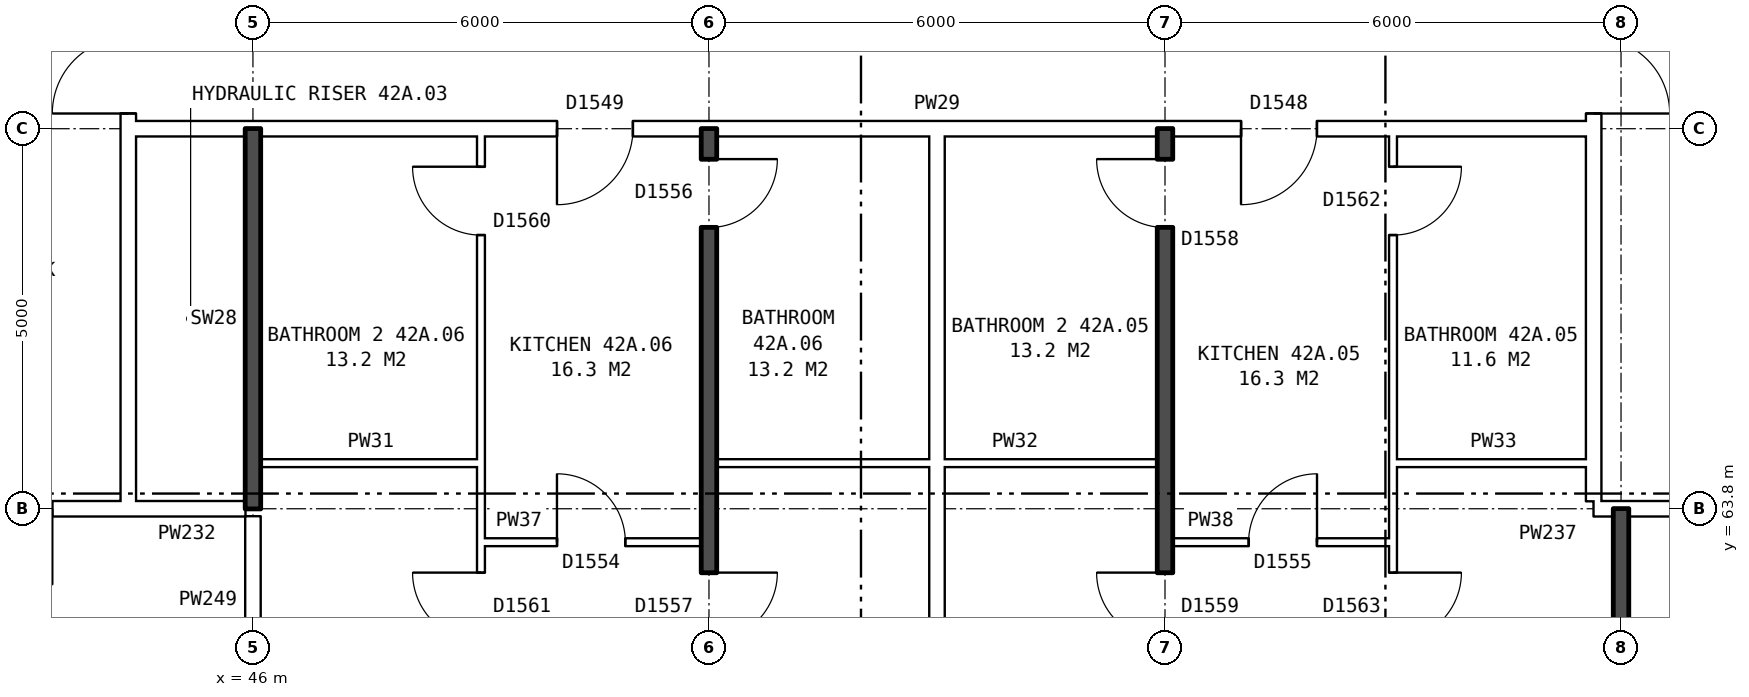
"""IFC4 building model, lengths in metres.
Left out: names, types, materials, properties, quantities, classifications, styles, units other than length and angle.
Written with IfcOpenShell. Run it as: python <this file> out.ifc"""

import sys

from ifc_helpers import new_model, si_unit, direction, frame, frame_2d, origin, place, context, subcontext, project, spatial, rectangle, extrude, element, fill, save


model = new_model("IFC4")
c1 = context("Model", 3, precision=1e-05, world=origin(), true_north=direction((0.0, 1.0)))
c2 = subcontext(c1, "Body", "Model", "MODEL_VIEW")
j1 = project(units=[si_unit("LENGTHUNIT", "METRE"), si_unit("PLANEANGLEUNIT", "RADIAN")], contexts=[c1])
p1 = place(None, origin())
s1 = spatial("IfcSite", under=j1, at=p1, CompositionType="ELEMENT")
p2 = place(p1, origin())
s2 = spatial("IfcBuilding", under=s1, at=p2, CompositionType="ELEMENT")
p3 = place(p2, frame((0.0, 0.0, 151.6)))
s3 = spatial("IfcBuildingStorey", under=s2, at=p3, CompositionType="ELEMENT", Elevation=151.6)
p4 = place(p3, frame((63.64, 63.9, 0.0), z_axis=(0.0, 0.0, 1.0), x_axis=(0.0, 1.0, 0.0)))
e1 = element("IfcWall", 1, at=p4, inside=s3, PredefinedType="PARTITIONING", context=c2, shape_type="SweptSolid", body=[
    extrude(rectangle(XDim=12.2, YDim=0.2, at=frame_2d((6.1, 0.0))), origin(), (0.0, 0.0, 1.0), 2.85),
])
p5 = place(p4, frame((5.1, 0.0, 0.0)))
e2 = element("IfcOpeningElement", 2, at=p5, cuts=e1, PredefinedType="OPENING", context=c2, shape_type="SweptSolid", body=[
    extrude(rectangle(XDim=2.0, YDim=2.1, at=frame_2d((1.0, 1.05))), frame((0.0, 0.11, 0.0), z_axis=(0.0, -1.0, 0.0), x_axis=(1.0, 0.0, 0.0)), (0.0, 0.0, 1.0), 0.22),
])
p6 = place(p3, frame((44.36, 63.9, 0.0), z_axis=(0.0, 0.0, 1.0), x_axis=(0.0, 1.0, 0.0)))
e3 = element("IfcWall", 3, at=p6, inside=s3, PredefinedType="PARTITIONING", context=c2, shape_type="SweptSolid", body=[
    extrude(rectangle(XDim=12.2, YDim=0.2, at=frame_2d((6.1, 0.0))), origin(), (0.0, 0.0, 1.0), 2.85),
])
p7 = place(p6, frame((5.1, 0.0, 0.0)))
e4 = element("IfcOpeningElement", 4, at=p7, cuts=e3, PredefinedType="OPENING", context=c2, shape_type="SweptSolid", body=[
    extrude(rectangle(XDim=2.0, YDim=2.1, at=frame_2d((1.0, 1.05))), frame((0.0, 0.11, 0.0), z_axis=(0.0, -1.0, 0.0), x_axis=(1.0, 0.0, 0.0)), (0.0, 0.0, 1.0), 0.22),
])
p8 = place(p3, frame((49.0, 63.36, 0.0), z_axis=(0.0, 0.0, 1.0), x_axis=(1.0, 0.0, 0.0)))
e5 = element("IfcWall", 5, at=p8, inside=s3, PredefinedType="PARTITIONING", context=c2, shape_type="SweptSolid", body=[
    extrude(rectangle(XDim=2.9, YDim=0.1, at=frame_2d((1.45, 0.0))), origin(), (0.0, 0.0, 1.0), 2.85),
])
p9 = place(p8, frame((1.0, 0.0, 0.0)))
e6 = element("IfcOpeningElement", 6, at=p9, cuts=e5, PredefinedType="OPENING", context=c2, shape_type="SweptSolid", body=[
    extrude(rectangle(XDim=0.9, YDim=2.1, at=frame_2d((0.45, 1.05))), frame((0.0, 0.06, 0.0), z_axis=(0.0, -1.0, 0.0), x_axis=(1.0, 0.0, 0.0)), (0.0, 0.0, 1.0), 0.12),
])
p10 = place(p3, frame((58.1, 63.36, 0.0), z_axis=(0.0, 0.0, 1.0), x_axis=(1.0, 0.0, 0.0)))
e7 = element("IfcWall", 7, at=p10, inside=s3, PredefinedType="PARTITIONING", context=c2, shape_type="SweptSolid", body=[
    extrude(rectangle(XDim=2.9, YDim=0.1, at=frame_2d((1.45, 0.0))), origin(), (0.0, 0.0, 1.0), 2.85),
])
p11 = place(p10, frame((1.0, 0.0, 0.0)))
e8 = element("IfcOpeningElement", 8, at=p11, cuts=e7, PredefinedType="OPENING", context=c2, shape_type="SweptSolid", body=[
    extrude(rectangle(XDim=0.9, YDim=2.1, at=frame_2d((0.45, 1.05))), frame((0.0, 0.06, 0.0), z_axis=(0.0, -1.0, 0.0), x_axis=(1.0, 0.0, 0.0)), (0.0, 0.0, 1.0), 0.12),
])
p12 = place(p3, frame((41.36, 63.8, 0.0), z_axis=(0.0, 0.0, 1.0), x_axis=(1.0, 0.0, 0.0)))
e9 = element("IfcWall", 9, at=p12, inside=s3, PredefinedType="PARTITIONING", context=c2, shape_type="SweptSolid", body=[
    extrude(rectangle(XDim=3.0, YDim=0.2, at=frame_2d((1.5, 0.0))), origin(), (0.0, 0.0, 1.0), 2.85),
])
p13 = place(p12, frame((1.0, 0.0, 0.0)))
e10 = element("IfcOpeningElement", 10, at=p13, cuts=e9, PredefinedType="OPENING", context=c2, shape_type="SweptSolid", body=[
    extrude(rectangle(XDim=1.0, YDim=2.1, at=frame_2d((0.5, 1.05))), frame((0.0, 0.11, 0.0), z_axis=(0.0, -1.0, 0.0), x_axis=(1.0, 0.0, 0.0)), (0.0, 0.0, 1.0), 0.22),
])
p14 = place(p3, frame((44.36, 63.8, 0.0), z_axis=(0.0, 0.0, 1.0), x_axis=(1.0, 0.0, 0.0)))
e11 = element("IfcWall", 11, at=p14, inside=s3, PredefinedType="PARTITIONING", context=c2, shape_type="SweptSolid", body=[
    extrude(rectangle(XDim=1.54, YDim=0.2, at=frame_2d((0.77, 0.0))), origin(), (0.0, 0.0, 1.0), 2.85),
])
p15 = place(p3, frame((63.64, 63.8, 0.0), z_axis=(0.0, 0.0, 1.0), x_axis=(1.0, 0.0, 0.0)))
e12 = element("IfcWall", 12, at=p15, inside=s3, PredefinedType="PARTITIONING", context=c2, shape_type="SweptSolid", body=[
    extrude(rectangle(XDim=3.0, YDim=0.2, at=frame_2d((1.5, 0.0))), origin(), (0.0, 0.0, 1.0), 2.85),
])
p16 = place(p15, frame((1.18, 0.0, 0.0)))
e13 = element("IfcOpeningElement", 13, at=p16, cuts=e12, PredefinedType="OPENING", context=c2, shape_type="SweptSolid", body=[
    extrude(rectangle(XDim=1.0, YDim=2.1, at=frame_2d((0.5, 1.05))), frame((0.0, 0.11, 0.0), z_axis=(0.0, -1.0, 0.0), x_axis=(1.0, 0.0, 0.0)), (0.0, 0.0, 1.0), 0.22),
])
p17 = place(p3, frame((46.1, 64.4, 0.0), z_axis=(0.0, 0.0, 1.0), x_axis=(1.0, 0.0, 0.0)))
e14 = element("IfcWall", 14, at=p17, inside=s3, PredefinedType="PARTITIONING", context=c2, shape_type="SweptSolid", body=[
    extrude(rectangle(XDim=2.9, YDim=0.1, at=frame_2d((1.45, 0.0))), origin(), (0.0, 0.0, 1.0), 2.85),
])
p18 = place(p3, frame((52.1, 64.4, 0.0), z_axis=(0.0, 0.0, 1.0), x_axis=(1.0, 0.0, 0.0)))
e15 = element("IfcWall", 15, at=p18, inside=s3, PredefinedType="PARTITIONING", context=c2, shape_type="SweptSolid", body=[
    extrude(rectangle(XDim=5.8, YDim=0.1, at=frame_2d((2.9, 0.0))), origin(), (0.0, 0.0, 1.0), 2.85),
])
p19 = place(p3, frame((61.0, 64.4, 0.0), z_axis=(0.0, 0.0, 1.0), x_axis=(1.0, 0.0, 0.0)))
e16 = element("IfcWall", 16, at=p19, inside=s3, PredefinedType="PARTITIONING", context=c2, shape_type="SweptSolid", body=[
    extrude(rectangle(XDim=2.64, YDim=0.1, at=frame_2d((1.32, 0.0))), origin(), (0.0, 0.0, 1.0), 2.85),
])
p20 = place(p3, frame((44.36, 68.8, 0.0), z_axis=(0.0, 0.0, 1.0), x_axis=(1.0, 0.0, 0.0)))
e17 = element("IfcWall", 17, at=p20, inside=s3, PredefinedType="PARTITIONING", context=c2, shape_type="SweptSolid", body=[
    extrude(rectangle(XDim=19.28, YDim=0.2, at=frame_2d((9.64, 0.0))), origin(), (0.0, 0.0, 1.0), 2.85),
])
p21 = place(p20, frame((14.64, 0.0, 0.0)))
e18 = element("IfcOpeningElement", 18, at=p21, cuts=e17, PredefinedType="OPENING", context=c2, shape_type="SweptSolid", body=[
    extrude(rectangle(XDim=1.0, YDim=2.1, at=frame_2d((0.5, 1.05))), frame((0.0, 0.11, 0.0), z_axis=(0.0, -1.0, 0.0), x_axis=(1.0, 0.0, 0.0)), (0.0, 0.0, 1.0), 0.22),
])
p22 = place(p20, frame((5.64, 0.0, 0.0)))
e19 = element("IfcOpeningElement", 19, at=p22, cuts=e17, PredefinedType="OPENING", context=c2, shape_type="SweptSolid", body=[
    extrude(rectangle(XDim=1.0, YDim=2.1, at=frame_2d((0.5, 1.05))), frame((0.0, 0.11, 0.0), z_axis=(0.0, -1.0, 0.0), x_axis=(1.0, 0.0, 0.0)), (0.0, 0.0, 1.0), 0.22),
])
p23 = place(p3, frame((46.0, 61.5, 0.0), z_axis=(0.0, 0.0, 1.0), x_axis=(0.0, 1.0, 0.0)))
e20 = element("IfcWall", 20, at=p23, inside=s3, PredefinedType="PARTITIONING", context=c2, shape_type="SweptSolid", body=[
    extrude(rectangle(XDim=2.2, YDim=0.2, at=frame_2d((1.1, 0.0))), origin(), (0.0, 0.0, 1.0), 2.85),
])
p24 = place(p3, frame((46.0, 63.8, 0.0), z_axis=(0.0, 0.0, 1.0), x_axis=(0.0, 1.0, 0.0)))
e21 = element("IfcWall", 21, at=p24, inside=s3, PredefinedType="SOLIDWALL", context=c2, shape_type="SweptSolid", body=[
    extrude(rectangle(XDim=5.0, YDim=0.2, at=frame_2d((2.5, 0.0))), origin(), (0.0, 0.0, 1.0), 2.85),
])
p25 = place(p3, frame((49.0, 54.36, 0.0), z_axis=(0.0, 0.0, 1.0), x_axis=(0.0, 1.0, 0.0)))
e22 = element("IfcWall", 22, at=p25, inside=s3, PredefinedType="PARTITIONING", context=c2, shape_type="SweptSolid", body=[
    extrude(rectangle(XDim=14.34, YDim=0.1, at=frame_2d((7.17, 0.0))), origin(), (0.0, 0.0, 1.0), 2.85),
])
p26 = place(p25, frame((7.7, 0.0, 0.0)))
e23 = element("IfcOpeningElement", 23, at=p26, cuts=e22, PredefinedType="OPENING", context=c2, shape_type="SweptSolid", body=[
    extrude(rectangle(XDim=0.9, YDim=2.1, at=frame_2d((0.45, 1.05))), frame((0.0, 0.06, 0.0), z_axis=(0.0, -1.0, 0.0), x_axis=(1.0, 0.0, 0.0)), (0.0, 0.0, 1.0), 0.12),
])
p27 = place(p25, frame((13.04, 0.0, 0.0)))
e24 = element("IfcOpeningElement", 24, at=p27, cuts=e22, PredefinedType="OPENING", context=c2, shape_type="SweptSolid", body=[
    extrude(rectangle(XDim=0.9, YDim=2.1, at=frame_2d((0.45, 1.05))), frame((0.0, 0.06, 0.0), z_axis=(0.0, -1.0, 0.0), x_axis=(1.0, 0.0, 0.0)), (0.0, 0.0, 1.0), 0.12),
])
p28 = place(p3, frame((52.0, 54.36, 0.0), z_axis=(0.0, 0.0, 1.0), x_axis=(0.0, 1.0, 0.0)))
e25 = element("IfcWall", 25, at=p28, inside=s3, PredefinedType="SOLIDWALL", context=c2, shape_type="SweptSolid", body=[
    extrude(rectangle(XDim=14.44, YDim=0.2, at=frame_2d((7.22, 0.0))), origin(), (0.0, 0.0, 1.0), 2.85),
])
p29 = place(p28, frame((7.7, 0.0, 0.0)))
e26 = element("IfcOpeningElement", 26, at=p29, cuts=e25, PredefinedType="OPENING", context=c2, shape_type="SweptSolid", body=[
    extrude(rectangle(XDim=0.9, YDim=2.1, at=frame_2d((0.45, 1.05))), frame((0.0, 0.11, 0.0), z_axis=(0.0, -1.0, 0.0), x_axis=(1.0, 0.0, 0.0)), (0.0, 0.0, 1.0), 0.22),
])
p30 = place(p28, frame((13.14, 0.0, 0.0)))
e27 = element("IfcOpeningElement", 27, at=p30, cuts=e25, PredefinedType="OPENING", context=c2, shape_type="SweptSolid", body=[
    extrude(rectangle(XDim=0.9, YDim=2.1, at=frame_2d((0.45, 1.05))), frame((0.0, 0.11, 0.0), z_axis=(0.0, -1.0, 0.0), x_axis=(1.0, 0.0, 0.0)), (0.0, 0.0, 1.0), 0.22),
])
p31 = place(p3, frame((55.0, 54.36, 0.0), z_axis=(0.0, 0.0, 1.0), x_axis=(0.0, 1.0, 0.0)))
e28 = element("IfcWall", 28, at=p31, inside=s3, PredefinedType="PARTITIONING", context=c2, shape_type="SweptSolid", body=[
    extrude(rectangle(XDim=14.34, YDim=0.2, at=frame_2d((7.17, 0.0))), origin(), (0.0, 0.0, 1.0), 2.85),
])
p32 = place(p3, frame((58.0, 54.36, 0.0), z_axis=(0.0, 0.0, 1.0), x_axis=(0.0, 1.0, 0.0)))
e29 = element("IfcWall", 29, at=p32, inside=s3, PredefinedType="SOLIDWALL", context=c2, shape_type="SweptSolid", body=[
    extrude(rectangle(XDim=14.44, YDim=0.2, at=frame_2d((7.22, 0.0))), origin(), (0.0, 0.0, 1.0), 2.85),
])
p33 = place(p32, frame((7.7, 0.0, 0.0)))
e30 = element("IfcOpeningElement", 30, at=p33, cuts=e29, PredefinedType="OPENING", context=c2, shape_type="SweptSolid", body=[
    extrude(rectangle(XDim=0.9, YDim=2.1, at=frame_2d((0.45, 1.05))), frame((0.0, 0.11, 0.0), z_axis=(0.0, -1.0, 0.0), x_axis=(1.0, 0.0, 0.0)), (0.0, 0.0, 1.0), 0.22),
])
p34 = place(p32, frame((13.14, 0.0, 0.0)))
e31 = element("IfcOpeningElement", 31, at=p34, cuts=e29, PredefinedType="OPENING", context=c2, shape_type="SweptSolid", body=[
    extrude(rectangle(XDim=0.9, YDim=2.1, at=frame_2d((0.45, 1.05))), frame((0.0, 0.11, 0.0), z_axis=(0.0, -1.0, 0.0), x_axis=(1.0, 0.0, 0.0)), (0.0, 0.0, 1.0), 0.22),
])
p35 = place(p3, frame((61.0, 54.36, 0.0), z_axis=(0.0, 0.0, 1.0), x_axis=(0.0, 1.0, 0.0)))
e32 = element("IfcWall", 32, at=p35, inside=s3, PredefinedType="PARTITIONING", context=c2, shape_type="SweptSolid", body=[
    extrude(rectangle(XDim=14.34, YDim=0.1, at=frame_2d((7.17, 0.0))), origin(), (0.0, 0.0, 1.0), 2.85),
])
p36 = place(p35, frame((7.7, 0.0, 0.0)))
e33 = element("IfcOpeningElement", 33, at=p36, cuts=e32, PredefinedType="OPENING", context=c2, shape_type="SweptSolid", body=[
    extrude(rectangle(XDim=0.9, YDim=2.1, at=frame_2d((0.45, 1.05))), frame((0.0, 0.06, 0.0), z_axis=(0.0, -1.0, 0.0), x_axis=(1.0, 0.0, 0.0)), (0.0, 0.0, 1.0), 0.12),
])
p37 = place(p35, frame((13.04, 0.0, 0.0)))
e34 = element("IfcOpeningElement", 34, at=p37, cuts=e32, PredefinedType="OPENING", context=c2, shape_type="SweptSolid", body=[
    extrude(rectangle(XDim=0.9, YDim=2.1, at=frame_2d((0.45, 1.05))), frame((0.0, 0.06, 0.0), z_axis=(0.0, -1.0, 0.0), x_axis=(1.0, 0.0, 0.0)), (0.0, 0.0, 1.0), 0.12),
])
p38 = place(p3, frame((64.0, 54.36, 0.0), z_axis=(0.0, 0.0, 1.0), x_axis=(0.0, 1.0, 0.0)))
e35 = element("IfcWall", 35, at=p38, inside=s3, PredefinedType="SOLIDWALL", context=c2, shape_type="SweptSolid", body=[
    extrude(rectangle(XDim=9.44, YDim=0.2, at=frame_2d((4.72, 0.0))), origin(), (0.0, 0.0, 1.0), 2.85),
])
p39 = place(p5, frame((2.0, 0.0, 0.0), z_axis=(0.0, 0.0, 1.0), x_axis=(-1.0, 0.0, 0.0)))
e36 = element("IfcDoor", 36, at=p39, inside=s3, OperationType="DOUBLE_DOOR_SINGLE_SWING", PredefinedType="DOOR", context=c2, shape_type="SweptSolid", body=[
    extrude(rectangle(XDim=2.0, YDim=2.1, at=frame_2d((1.0, 1.05))), frame((0.0, 0.025, 0.0), z_axis=(0.0, -1.0, 0.0), x_axis=(1.0, 0.0, 0.0)), (0.0, 0.0, 1.0), 0.05),
])
fill(e2, e36)
p40 = place(p7, origin())
e37 = element("IfcDoor", 37, at=p40, inside=s3, OperationType="DOUBLE_DOOR_SINGLE_SWING", PredefinedType="DOOR", context=c2, shape_type="SweptSolid", body=[
    extrude(rectangle(XDim=2.0, YDim=2.1, at=frame_2d((1.0, 1.05))), frame((0.0, 0.025, 0.0), z_axis=(0.0, -1.0, 0.0), x_axis=(1.0, 0.0, 0.0)), (0.0, 0.0, 1.0), 0.05),
])
fill(e4, e37)
p41 = place(p36, frame((0.9, 0.0, 0.0), z_axis=(0.0, 0.0, 1.0), x_axis=(-1.0, 0.0, 0.0)))
e38 = element("IfcDoor", 38, at=p41, inside=s3, OperationType="SINGLE_SWING_LEFT", PredefinedType="DOOR", context=c2, shape_type="SweptSolid", body=[
    extrude(rectangle(XDim=0.9, YDim=2.1, at=frame_2d((0.45, 1.05))), frame((0.0, 0.025, 0.0), z_axis=(0.0, -1.0, 0.0), x_axis=(1.0, 0.0, 0.0)), (0.0, 0.0, 1.0), 0.05),
])
fill(e33, e38)
p42 = place(p33, origin())
e39 = element("IfcDoor", 39, at=p42, inside=s3, OperationType="SINGLE_SWING_RIGHT", PredefinedType="DOOR", context=c2, shape_type="SweptSolid", body=[
    extrude(rectangle(XDim=0.9, YDim=2.1, at=frame_2d((0.45, 1.05))), frame((0.0, 0.025, 0.0), z_axis=(0.0, -1.0, 0.0), x_axis=(1.0, 0.0, 0.0)), (0.0, 0.0, 1.0), 0.05),
])
fill(e30, e39)
p43 = place(p21, frame((1.0, 0.0, 0.0), z_axis=(0.0, 0.0, 1.0), x_axis=(-1.0, 0.0, 0.0)))
e40 = element("IfcDoor", 40, at=p43, inside=s3, OperationType="SINGLE_SWING_RIGHT", PredefinedType="DOOR", context=c2, shape_type="SweptSolid", body=[
    extrude(rectangle(XDim=1.0, YDim=2.1, at=frame_2d((0.5, 1.05))), frame((0.0, 0.025, 0.0), z_axis=(0.0, -1.0, 0.0), x_axis=(1.0, 0.0, 0.0)), (0.0, 0.0, 1.0), 0.05),
])
fill(e18, e40)
p44 = place(p11, origin())
e41 = element("IfcDoor", 41, at=p44, inside=s3, OperationType="SINGLE_SWING_RIGHT", PredefinedType="DOOR", context=c2, shape_type="SweptSolid", body=[
    extrude(rectangle(XDim=0.9, YDim=2.1, at=frame_2d((0.45, 1.05))), frame((0.0, 0.025, 0.0), z_axis=(0.0, -1.0, 0.0), x_axis=(1.0, 0.0, 0.0)), (0.0, 0.0, 1.0), 0.05),
])
fill(e8, e41)
p45 = place(p37, frame((0.9, 0.0, 0.0), z_axis=(0.0, 0.0, 1.0), x_axis=(-1.0, 0.0, 0.0)))
e42 = element("IfcDoor", 42, at=p45, inside=s3, OperationType="SINGLE_SWING_LEFT", PredefinedType="DOOR", context=c2, shape_type="SweptSolid", body=[
    extrude(rectangle(XDim=0.9, YDim=2.1, at=frame_2d((0.45, 1.05))), frame((0.0, 0.025, 0.0), z_axis=(0.0, -1.0, 0.0), x_axis=(1.0, 0.0, 0.0)), (0.0, 0.0, 1.0), 0.05),
])
fill(e34, e42)
p46 = place(p34, origin())
e43 = element("IfcDoor", 43, at=p46, inside=s3, OperationType="SINGLE_SWING_RIGHT", PredefinedType="DOOR", context=c2, shape_type="SweptSolid", body=[
    extrude(rectangle(XDim=0.9, YDim=2.1, at=frame_2d((0.45, 1.05))), frame((0.0, 0.025, 0.0), z_axis=(0.0, -1.0, 0.0), x_axis=(1.0, 0.0, 0.0)), (0.0, 0.0, 1.0), 0.05),
])
fill(e31, e43)
p47 = place(p29, frame((0.9, 0.0, 0.0), z_axis=(0.0, 0.0, 1.0), x_axis=(-1.0, 0.0, 0.0)))
e44 = element("IfcDoor", 44, at=p47, inside=s3, OperationType="SINGLE_SWING_LEFT", PredefinedType="DOOR", context=c2, shape_type="SweptSolid", body=[
    extrude(rectangle(XDim=0.9, YDim=2.1, at=frame_2d((0.45, 1.05))), frame((0.0, 0.025, 0.0), z_axis=(0.0, -1.0, 0.0), x_axis=(1.0, 0.0, 0.0)), (0.0, 0.0, 1.0), 0.05),
])
fill(e26, e44)
p48 = place(p26, origin())
e45 = element("IfcDoor", 45, at=p48, inside=s3, OperationType="SINGLE_SWING_RIGHT", PredefinedType="DOOR", context=c2, shape_type="SweptSolid", body=[
    extrude(rectangle(XDim=0.9, YDim=2.1, at=frame_2d((0.45, 1.05))), frame((0.0, 0.025, 0.0), z_axis=(0.0, -1.0, 0.0), x_axis=(1.0, 0.0, 0.0)), (0.0, 0.0, 1.0), 0.05),
])
fill(e23, e45)
p49 = place(p22, frame((1.0, 0.0, 0.0), z_axis=(0.0, 0.0, 1.0), x_axis=(-1.0, 0.0, 0.0)))
e46 = element("IfcDoor", 46, at=p49, inside=s3, OperationType="SINGLE_SWING_RIGHT", PredefinedType="DOOR", context=c2, shape_type="SweptSolid", body=[
    extrude(rectangle(XDim=1.0, YDim=2.1, at=frame_2d((0.5, 1.05))), frame((0.0, 0.025, 0.0), z_axis=(0.0, -1.0, 0.0), x_axis=(1.0, 0.0, 0.0)), (0.0, 0.0, 1.0), 0.05),
])
fill(e19, e46)
p50 = place(p9, origin())
e47 = element("IfcDoor", 47, at=p50, inside=s3, OperationType="SINGLE_SWING_LEFT", PredefinedType="DOOR", context=c2, shape_type="SweptSolid", body=[
    extrude(rectangle(XDim=0.9, YDim=2.1, at=frame_2d((0.45, 1.05))), frame((0.0, 0.025, 0.0), z_axis=(0.0, -1.0, 0.0), x_axis=(1.0, 0.0, 0.0)), (0.0, 0.0, 1.0), 0.05),
])
fill(e6, e47)
p51 = place(p30, frame((0.9, 0.0, 0.0), z_axis=(0.0, 0.0, 1.0), x_axis=(-1.0, 0.0, 0.0)))
e48 = element("IfcDoor", 48, at=p51, inside=s3, OperationType="SINGLE_SWING_LEFT", PredefinedType="DOOR", context=c2, shape_type="SweptSolid", body=[
    extrude(rectangle(XDim=0.9, YDim=2.1, at=frame_2d((0.45, 1.05))), frame((0.0, 0.025, 0.0), z_axis=(0.0, -1.0, 0.0), x_axis=(1.0, 0.0, 0.0)), (0.0, 0.0, 1.0), 0.05),
])
fill(e27, e48)
p52 = place(p27, origin())
e49 = element("IfcDoor", 49, at=p52, inside=s3, OperationType="SINGLE_SWING_RIGHT", PredefinedType="DOOR", context=c2, shape_type="SweptSolid", body=[
    extrude(rectangle(XDim=0.9, YDim=2.1, at=frame_2d((0.45, 1.05))), frame((0.0, 0.025, 0.0), z_axis=(0.0, -1.0, 0.0), x_axis=(1.0, 0.0, 0.0)), (0.0, 0.0, 1.0), 0.05),
])
fill(e24, e49)
save(model, sys.argv[1])
